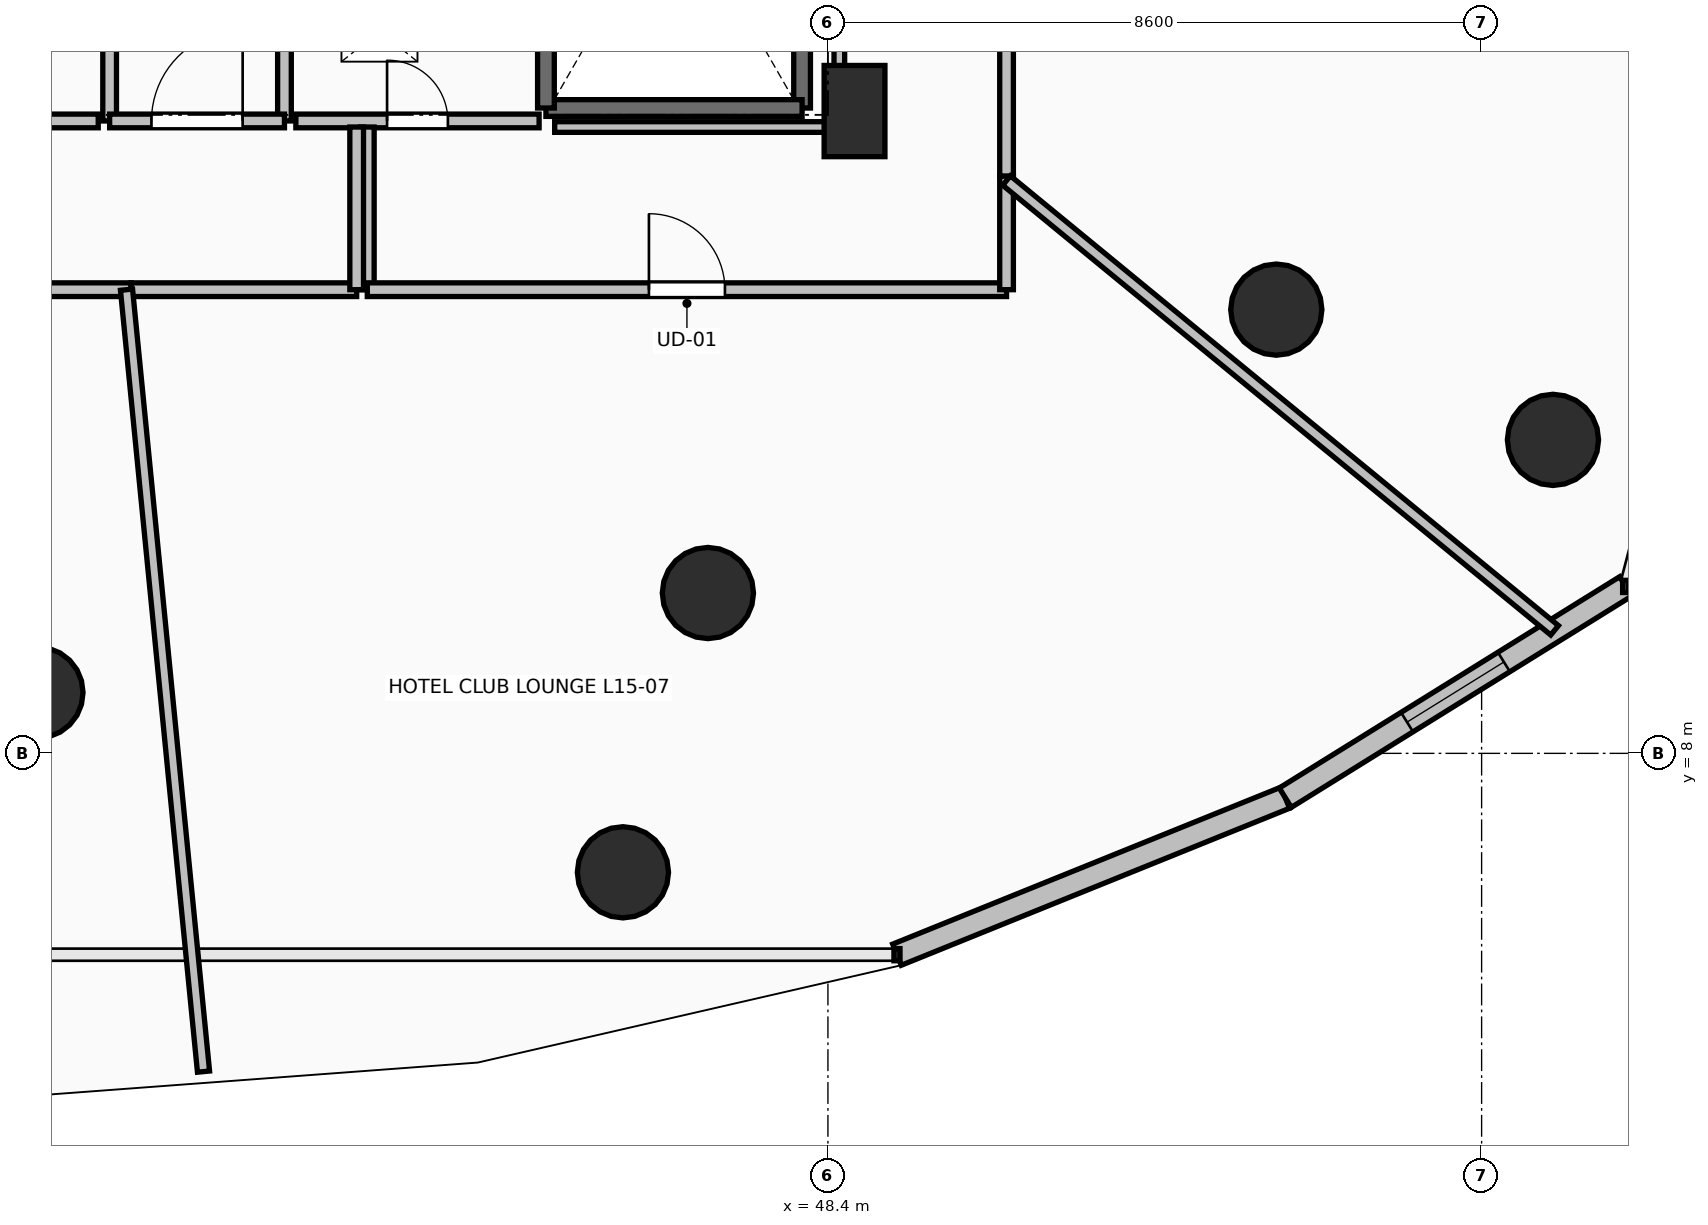
"""IFC4 building model, lengths in metres.
Left out: names, types, materials, properties, quantities, classifications, styles, units other than length and angle.
Written with IfcOpenShell. Run it as: python <this file> out.ifc"""

import sys

from ifc_helpers import new_model, si_unit, direction, frame, frame_2d, origin, origin_2d, place, context, subcontext, project, spatial, rectangle, circle, extrude, element, fill, save


model = new_model("IFC4")
c1 = context("Model", 3, precision=1e-05, world=origin(), true_north=direction((0.0, 1.0)))
c2 = subcontext(c1, "Body", "Model", "MODEL_VIEW")
j1 = project(units=[si_unit("LENGTHUNIT", "METRE"), si_unit("PLANEANGLEUNIT", "RADIAN")], contexts=[c1])
p1 = place(None, origin())
s1 = spatial("IfcSite", under=j1, at=p1, CompositionType="ELEMENT")
p2 = place(p1, origin())
s2 = spatial("IfcBuilding", under=s1, at=p2, CompositionType="ELEMENT")
p3 = place(p2, frame((0.0, 0.0, 59.0)))
s3 = spatial("IfcBuildingStorey", under=s2, at=p3, CompositionType="ELEMENT", Elevation=59.0)
for number, where, z_axis, x_axis in (
    (1, (38.0, 8.8, 0.0), (0.0, 0.0, 1.0), (0.0, -1.0, 0.0)),
    (2, (46.821, 10.109, 0.0), (0.0, 0.0, 1.0), (0.383, -0.924, 0.0)),
    (3, (54.299, 13.838, 0.0), (0.0, 0.0, 1.0), (0.707, -0.707, 0.0)),
    (4, (45.703, 6.435, 0.0), (0.0, 0.0, 1.0), (0.383, -0.924, 0.0)),
    (5, (57.939, 12.124, 0.0), (0.0, 0.0, 1.0), (0.707, -0.707, 0.0)),
):
    element("IfcColumn", number, at=place(p3, frame(where, z_axis=z_axis, x_axis=x_axis)), inside=s3, PredefinedType="COLUMN", context=c2, shape_type="SweptSolid", body=[
        extrude(circle(Radius=0.6, at=origin_2d()), origin(), (0.0, 0.0, 1.0), 3.5),
    ])
p4 = place(p3, frame((48.75, 16.45, 0.0), z_axis=(0.0, 0.0, 1.0), x_axis=(1.0, 0.0, 0.0)))
e6 = element("IfcColumn", 6, at=p4, inside=s3, PredefinedType="PILASTER", context=c2, shape_type="SweptSolid", body=[
    extrude(rectangle(XDim=0.8, YDim=1.2, at=origin_2d()), origin(), (0.0, 0.0, 1.0), 3.5),
])
p5 = place(p3, frame((49.308, 5.351, 0.0), z_axis=(0.0, 0.0, 1.0), x_axis=(0.927095325176, 0.374825636845, 0.0)))
e7 = element("IfcWall", 7, at=p5, inside=s3, PredefinedType="STANDARD", context=c2, shape_type="SweptSolid", body=[
    extrude(rectangle(XDim=5.51, YDim=0.3, at=frame_2d((2.755, 0.0))), origin(), (0.0, 0.0, 1.0), 3.24),
])
p6 = place(p3, frame((54.417, 7.417, 0.0), z_axis=(0.0, 0.0, 1.0), x_axis=(0.849633724826, 0.527373239404, 0.0)))
e8 = element("IfcWall", 8, at=p6, inside=s3, PredefinedType="STANDARD", context=c2, shape_type="SweptSolid", body=[
    extrude(rectangle(XDim=5.271, YDim=0.3, at=frame_2d((2.635, 0.0))), origin(), (0.0, 0.0, 1.0), 3.24),
])
p7 = place(p6, frame((1.885, 0.0, 0.85)))
e9 = element("IfcOpeningElement", 9, at=p7, cuts=e8, PredefinedType="OPENING", context=c2, shape_type="SweptSolid", body=[
    extrude(rectangle(XDim=1.5, YDim=2.19, at=frame_2d((0.75, 1.095))), frame((0.0, 0.165, 0.0), z_axis=(0.0, -1.0, 0.0), x_axis=(1.0, 0.0, 0.0)), (0.0, 0.0, 1.0), 0.33),
])
p8 = place(p3, frame((48.06, 23.91, 0.0), z_axis=(0.0, 0.0, 1.0), x_axis=(0.0, -1.0, 0.0)))
e10 = element("IfcWall", 10, at=p8, inside=s3, PredefinedType="SOLIDWALL", context=c2, shape_type="SweptSolid", body=[
    extrude(rectangle(XDim=7.42, YDim=0.22, at=frame_2d((3.71, 0.0))), origin(), (0.0, 0.0, 1.0), 3.24),
])
p9 = place(p3, frame((48.06, 16.49, 0.0), z_axis=(0.0, 0.0, 1.0), x_axis=(-1.0, 0.0, 0.0)))
e11 = element("IfcWall", 11, at=p9, inside=s3, PredefinedType="SOLIDWALL", context=c2, shape_type="SweptSolid", body=[
    extrude(rectangle(XDim=3.37, YDim=0.22, at=frame_2d((1.685, 0.0))), origin(), (0.0, 0.0, 1.0), 3.24),
])
p10 = place(p3, frame((44.69, 16.49, 0.0), z_axis=(0.0, 0.0, 1.0), x_axis=(0.0, 1.0, 0.0)))
e12 = element("IfcWall", 12, at=p10, inside=s3, PredefinedType="SOLIDWALL", context=c2, shape_type="SweptSolid", body=[
    extrude(rectangle(XDim=7.42, YDim=0.22, at=frame_2d((3.71, 0.0))), origin(), (0.0, 0.0, 1.0), 3.24),
])
p11 = place(p3, frame((41.25, 16.32, 0.0), z_axis=(0.0, 0.0, 1.0), x_axis=(0.0, 1.0, 0.0)))
e13 = element("IfcWall", 13, at=p11, inside=s3, PredefinedType="PARTITIONING", context=c2, shape_type="SweptSolid", body=[
    extrude(rectangle(XDim=7.88, YDim=0.18, at=frame_2d((3.94, 0.0))), origin(), (0.0, 0.0, 1.0), 3.24),
])
p12 = place(p11, frame((3.54, 0.0, 0.0)))
e14 = element("IfcOpeningElement", 14, at=p12, cuts=e13, PredefinedType="OPENING", context=c2, shape_type="SweptSolid", body=[
    extrude(rectangle(XDim=0.8, YDim=2.05, at=frame_2d((0.4, 1.025))), frame((0.0, 0.105, 0.0), z_axis=(0.0, -1.0, 0.0), x_axis=(1.0, 0.0, 0.0)), (0.0, 0.0, 1.0), 0.21),
])
p13 = place(p3, frame((38.95, 21.755, 0.0), z_axis=(0.0, 0.0, 1.0), x_axis=(0.0, -1.0, 0.0)))
e15 = element("IfcWall", 15, at=p13, inside=s3, PredefinedType="PARTITIONING", context=c2, shape_type="SweptSolid", body=[
    extrude(rectangle(XDim=5.435, YDim=0.18, at=frame_2d((2.717, 0.0))), origin(), (0.0, 0.0, 1.0), 3.24),
])
p14 = place(p13, frame((2.292, 0.0, 0.0)))
e16 = element("IfcOpeningElement", 16, at=p14, cuts=e15, PredefinedType="OPENING", context=c2, shape_type="SweptSolid", body=[
    extrude(rectangle(XDim=0.85, YDim=2.1, at=frame_2d((0.425, 1.05))), frame((0.0, 0.105, 0.0), z_axis=(0.0, -1.0, 0.0), x_axis=(1.0, 0.0, 0.0)), (0.0, 0.0, 1.0), 0.21),
])
p15 = place(p3, frame((38.95, 16.32, 0.0), z_axis=(0.0, 0.0, 1.0), x_axis=(1.0, 0.0, 0.0)))
e17 = element("IfcWall", 17, at=p15, inside=s3, PredefinedType="PARTITIONING", context=c2, shape_type="SweptSolid", body=[
    extrude(rectangle(XDim=2.3, YDim=0.18, at=frame_2d((1.15, 0.0))), origin(), (0.0, 0.0, 1.0), 3.24),
])
p16 = place(p15, frame((0.55, 0.0, 0.0)))
e18 = element("IfcOpeningElement", 18, at=p16, cuts=e17, PredefinedType="OPENING", context=c2, shape_type="SweptSolid", body=[
    extrude(rectangle(XDim=1.2, YDim=2.15, at=frame_2d((0.6, 1.075))), frame((0.0, 0.105, 0.0), z_axis=(0.0, -1.0, 0.0), x_axis=(1.0, 0.0, 0.0)), (0.0, 0.0, 1.0), 0.21),
])
p17 = place(p3, frame((41.4, 16.32, 0.0), z_axis=(0.0, 0.0, 1.0), x_axis=(1.0, 0.0, 0.0)))
e19 = element("IfcWall", 19, at=p17, inside=s3, PredefinedType="PARTITIONING", context=c2, shape_type="SweptSolid", body=[
    extrude(rectangle(XDim=3.2, YDim=0.18, at=frame_2d((1.6, 0.0))), origin(), (0.0, 0.0, 1.0), 3.24),
])
p18 = place(p17, frame((1.2, 0.0, 0.0)))
e20 = element("IfcOpeningElement", 20, at=p18, cuts=e19, PredefinedType="OPENING", context=c2, shape_type="SweptSolid", body=[
    extrude(rectangle(XDim=0.8, YDim=2.05, at=frame_2d((0.4, 1.025))), frame((0.0, 0.105, 0.0), z_axis=(0.0, -1.0, 0.0), x_axis=(1.0, 0.0, 0.0)), (0.0, 0.0, 1.0), 0.21),
])
p19 = place(p3, frame((35.2, 16.32, 0.0), z_axis=(0.0, 0.0, 1.0), x_axis=(1.0, 0.0, 0.0)))
e21 = element("IfcWall", 21, at=p19, inside=s3, PredefinedType="PARTITIONING", context=c2, shape_type="SweptSolid", body=[
    extrude(rectangle(XDim=3.6, YDim=0.18, at=frame_2d((1.8, 0.0))), origin(), (0.0, 0.0, 1.0), 3.24),
])
p20 = place(p19, frame((1.375, 0.0, 0.0)))
e22 = element("IfcOpeningElement", 22, at=p20, cuts=e21, PredefinedType="OPENING", context=c2, shape_type="SweptSolid", body=[
    extrude(rectangle(XDim=0.85, YDim=2.1, at=frame_2d((0.425, 1.05))), frame((0.0, 0.105, 0.0), z_axis=(0.0, -1.0, 0.0), x_axis=(1.0, 0.0, 0.0)), (0.0, 0.0, 1.0), 0.21),
])
p21 = place(p3, frame((33.704, 14.1, 0.0), z_axis=(0.0, 0.0, 1.0), x_axis=(1.0, 0.0, 0.0)))
e23 = element("IfcWall", 23, at=p21, inside=s3, PredefinedType="PARTITIONING", context=c2, shape_type="SweptSolid", body=[
    extrude(rectangle(XDim=5.528, YDim=0.18, at=frame_2d((2.764, 0.0))), origin(), (0.0, 0.0, 1.0), 3.24),
])
p22 = place(p21, frame((2.239, 0.0, 0.0)))
e24 = element("IfcOpeningElement", 24, at=p22, cuts=e23, PredefinedType="OPENING", context=c2, shape_type="SweptSolid", body=[
    extrude(rectangle(XDim=1.05, YDim=2.2, at=frame_2d((0.525, 1.1))), frame((0.0, 0.105, 0.0), z_axis=(0.0, -1.0, 0.0), x_axis=(1.0, 0.0, 0.0)), (0.0, 0.0, 1.0), 0.21),
])
p23 = place(p3, frame((42.34, 16.24, 0.0), z_axis=(0.0, 0.0, 1.0), x_axis=(0.0, -1.0, 0.0)))
e25 = element("IfcWall", 25, at=p23, inside=s3, PredefinedType="PARTITIONING", context=c2, shape_type="SweptSolid", body=[
    extrude(rectangle(XDim=2.14, YDim=0.18, at=frame_2d((1.07, 0.0))), origin(), (0.0, 0.0, 1.0), 3.24),
])
p24 = place(p3, frame((42.34, 14.1, 0.0), z_axis=(0.0, 0.0, 1.0), x_axis=(1.0, 0.0, 0.0)))
e26 = element("IfcWall", 26, at=p24, inside=s3, PredefinedType="PARTITIONING", context=c2, shape_type="SweptSolid", body=[
    extrude(rectangle(XDim=8.41, YDim=0.18, at=frame_2d((4.205, 0.0))), origin(), (0.0, 0.0, 1.0), 2.432),
])
p25 = place(p24, frame((3.705, 0.0, 0.0)))
e27 = element("IfcOpeningElement", 27, at=p25, cuts=e26, PredefinedType="OPENING", context=c2, shape_type="SweptSolid", body=[
    extrude(rectangle(XDim=1.0, YDim=2.15, at=frame_2d((0.5, 1.075))), frame((0.0, 0.105, 0.0), z_axis=(0.0, -1.0, 0.0), x_axis=(1.0, 0.0, 0.0)), (0.0, 0.0, 1.0), 0.21),
])
p26 = place(p3, frame((50.75, 14.1, 0.0), z_axis=(0.0, 0.0, 1.0), x_axis=(0.0, 1.0, 0.0)))
e28 = element("IfcWall", 28, at=p26, inside=s3, PredefinedType="PARTITIONING", context=c2, shape_type="SweptSolid", body=[
    extrude(rectangle(XDim=1.496, YDim=0.18, at=frame_2d((0.748, 0.0))), origin(), (0.0, 0.0, 1.0), 2.432),
])
p27 = place(p3, frame((39.232, 14.1, 0.0), z_axis=(0.0, 0.0, 1.0), x_axis=(1.0, 0.0, 0.0)))
e29 = element("IfcWall", 29, at=p27, inside=s3, PredefinedType="PARTITIONING", context=c2, shape_type="SweptSolid", body=[
    extrude(rectangle(XDim=2.968, YDim=0.18, at=frame_2d((1.484, 0.0))), origin(), (0.0, 0.0, 1.0), 3.24),
])
p28 = place(p3, frame((42.2, 14.1, 0.0), z_axis=(0.0, 0.0, 1.0), x_axis=(0.0, 1.0, 0.0)))
e30 = element("IfcWall", 30, at=p28, inside=s3, PredefinedType="PARTITIONING", context=c2, shape_type="SweptSolid", body=[
    extrude(rectangle(XDim=2.14, YDim=0.18, at=frame_2d((1.07, 0.0))), origin(), (0.0, 0.0, 1.0), 3.24),
])
p29 = place(p3, frame((50.75, 15.596, 0.0), z_axis=(0.0, 0.0, 1.0), x_axis=(0.0, 1.0, 0.0)))
e31 = element("IfcWall", 31, at=p29, inside=s3, PredefinedType="PARTITIONING", context=c2, shape_type="SweptSolid", body=[
    extrude(rectangle(XDim=11.46, YDim=0.18, at=frame_2d((5.73, 0.0))), origin(), (0.0, 0.0, 1.0), 2.432),
])
p30 = place(p29, frame((5.23, 0.0, 0.0)))
e32 = element("IfcOpeningElement", 32, at=p30, cuts=e31, PredefinedType="OPENING", context=c2, shape_type="SweptSolid", body=[
    extrude(rectangle(XDim=1.0, YDim=2.15, at=frame_2d((0.5, 1.075))), frame((0.0, 0.105, 0.0), z_axis=(0.0, -1.0, 0.0), x_axis=(1.0, 0.0, 0.0)), (0.0, 0.0, 1.0), 0.21),
])
p31 = place(p3, frame((40.185, 3.813, 0.0), z_axis=(0.0, 0.0, 1.0), x_axis=(-0.097992958783, 0.99518710805, 0.0)))
e33 = element("IfcWall", 33, at=p31, inside=s3, PredefinedType="PARTITIONING", context=c2, shape_type="SweptSolid", body=[
    extrude(rectangle(XDim=10.337, YDim=0.16, at=frame_2d((5.168, 0.0))), origin(), (0.0, 0.0, 1.0), 2.432),
])
p32 = place(p3, frame((57.96, 9.619, 0.0), z_axis=(0.0, 0.0, 1.0), x_axis=(-0.773014125172, 0.634388810025, 0.0)))
e34 = element("IfcWall", 34, at=p32, inside=s3, PredefinedType="PARTITIONING", context=c2, shape_type="SweptSolid", body=[
    extrude(rectangle(XDim=9.327, YDim=0.16, at=frame_2d((4.664, 0.0))), origin(), (0.0, 0.0, 1.0), 2.432),
])
p33 = place(p3, frame((48.55, 23.754, 0.0), z_axis=(0.0, 0.0, 1.0), x_axis=(0.0, -1.0, 0.0)))
e35 = element("IfcWall", 35, at=p33, inside=s3, PredefinedType="PARTITIONING", context=c2, shape_type="SweptSolid", body=[
    extrude(rectangle(XDim=7.514, YDim=0.14, at=frame_2d((3.757, 0.0))), origin(), (0.0, 0.0, 1.0), 2.432),
])
p34 = place(p3, frame((48.55, 16.24, 0.0), z_axis=(0.0, 0.0, 1.0), x_axis=(-1.0, 0.0, 0.0)))
e36 = element("IfcWall", 36, at=p34, inside=s3, PredefinedType="PARTITIONING", context=c2, shape_type="SweptSolid", body=[
    extrude(rectangle(XDim=3.745, YDim=0.14, at=frame_2d((1.873, 0.0))), origin(), (0.0, 0.0, 1.0), 2.432),
])
p35 = place(p7, origin())
e37 = element("IfcWindow", 37, at=p35, inside=s3, PartitioningType="SINGLE_PANEL", PredefinedType="WINDOW", context=c2, shape_type="SweptSolid", body=[
    extrude(rectangle(XDim=1.5, YDim=2.19, at=frame_2d((0.75, 1.095))), frame((0.0, 0.03, 0.0), z_axis=(0.0, -1.0, 0.0), x_axis=(1.0, 0.0, 0.0)), (0.0, 0.0, 1.0), 0.06),
])
fill(e9, e37)
p36 = place(p16, origin())
e38 = element("IfcDoor", 38, at=p36, inside=s3, OperationType="SINGLE_SWING_RIGHT", PredefinedType="DOOR", context=c2, shape_type="SweptSolid", body=[
    extrude(rectangle(XDim=1.2, YDim=2.15, at=frame_2d((0.6, 1.075))), frame((0.0, 0.025, 0.0), z_axis=(0.0, -1.0, 0.0), x_axis=(1.0, 0.0, 0.0)), (0.0, 0.0, 1.0), 0.05),
])
fill(e18, e38)
p37 = place(p18, origin())
e39 = element("IfcDoor", 39, at=p37, inside=s3, OperationType="SINGLE_SWING_LEFT", PredefinedType="DOOR", context=c2, shape_type="SweptSolid", body=[
    extrude(rectangle(XDim=0.8, YDim=2.05, at=frame_2d((0.4, 1.025))), frame((0.0, 0.025, 0.0), z_axis=(0.0, -1.0, 0.0), x_axis=(1.0, 0.0, 0.0)), (0.0, 0.0, 1.0), 0.05),
])
fill(e20, e39)
p38 = place(p25, origin())
e40 = element("IfcDoor", 40, at=p38, inside=s3, OperationType="SINGLE_SWING_LEFT", PredefinedType="DOOR", context=c2, shape_type="SweptSolid", body=[
    extrude(rectangle(XDim=1.0, YDim=2.15, at=frame_2d((0.5, 1.075))), frame((0.0, 0.025, 0.0), z_axis=(0.0, -1.0, 0.0), x_axis=(1.0, 0.0, 0.0)), (0.0, 0.0, 1.0), 0.05),
])
fill(e27, e40)
save(model, sys.argv[1])
